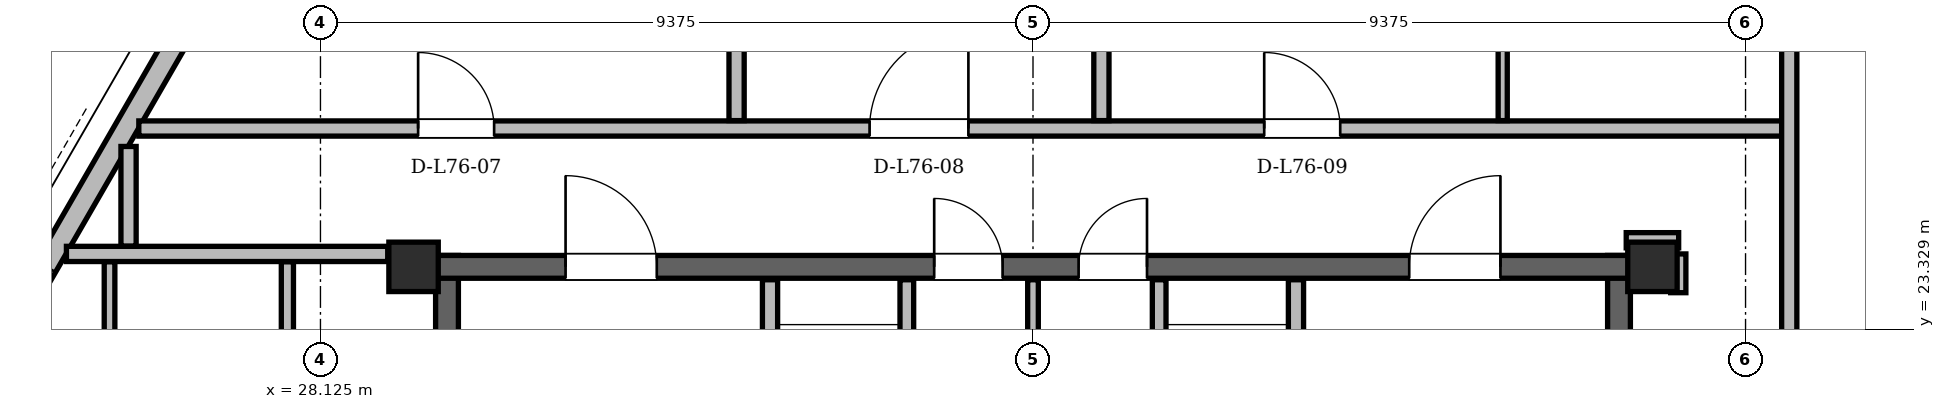
"""IFC4 building model, lengths in metres.
Left out: names, types, materials, properties, quantities, classifications, styles, units other than length and angle.
Written with IfcOpenShell. Run it as: python <this file> out.ifc"""

import sys

from ifc_helpers import new_model, si_unit, direction, frame, frame_2d, origin, origin_2d, place, context, subcontext, project, spatial, rectangle, hollow_rectangle, extrude, element, fill, save


model = new_model("IFC4")
c1 = context("Model", 3, precision=1e-05, world=origin(), true_north=direction((0.0, 1.0)))
c2 = subcontext(c1, "Body", "Model", "MODEL_VIEW")
j1 = project(units=[si_unit("LENGTHUNIT", "METRE"), si_unit("PLANEANGLEUNIT", "RADIAN")], contexts=[c1])
p1 = place(None, origin())
s1 = spatial("IfcSite", under=j1, at=p1, CompositionType="ELEMENT")
p2 = place(p1, origin())
s2 = spatial("IfcBuilding", under=s1, at=p2, CompositionType="ELEMENT")
p3 = place(p2, frame((0.0, 0.0, 288.9)))
s3 = spatial("IfcBuildingStorey", under=s2, at=p3, CompositionType="ELEMENT", Elevation=288.9)
for number, where, z_axis, x_axis in (
    (1, (45.65, 24.15, 0.0), (0.0, 0.0, 1.0), (1.0, 0.0, 0.0)),
    (2, (29.35, 24.15, 0.0), (0.0, 0.0, 1.0), (1.0, 0.0, 0.0)),
):
    element("IfcColumn", number, at=place(p3, frame(where, z_axis=z_axis, x_axis=x_axis)), inside=s3, PredefinedType="COLUMN", context=c2, shape_type="SweptSolid", body=[
        extrude(hollow_rectangle(XDim=0.65, YDim=0.65, WallThickness=0.05, at=origin_2d()), origin(), (0.0, 0.0, 1.0), 3.9),
    ])
for number, where, z_axis, x_axis in (
    (3, (29.79, 11.0, 0.0), (0.0, 0.0, 1.0), (0.0, 1.0, 0.0)),
    (4, (45.21, 11.0, 0.0), (0.0, 0.0, 1.0), (0.0, 1.0, 0.0)),
):
    element("IfcWall", number, at=place(p3, frame(where, z_axis=z_axis, x_axis=x_axis)), inside=s3, PredefinedType="SHEAR", context=c2, shape_type="SweptSolid", body=[
        extrude(rectangle(XDim=13.3, YDim=0.3, at=frame_2d((6.65, 0.0))), origin(), (0.0, 0.0, 1.0), 3.68),
    ])
p4 = place(p3, frame((29.65, 24.15, 0.0), z_axis=(0.0, 0.0, 1.0), x_axis=(1.0, 0.0, 0.0)))
e5 = element("IfcWall", 5, at=p4, inside=s3, PredefinedType="SHEAR", context=c2, shape_type="SweptSolid", body=[
    extrude(rectangle(XDim=15.7, YDim=0.3, at=frame_2d((7.85, 0.0))), origin(), (0.0, 0.0, 1.0), 3.68),
])
p5 = place(p4, frame((1.7, 0.0, 0.0)))
e6 = element("IfcOpeningElement", 6, at=p5, cuts=e5, PredefinedType="OPENING", context=c2, shape_type="SweptSolid", body=[
    extrude(rectangle(XDim=1.2, YDim=2.2, at=frame_2d((0.6, 1.1))), frame((0.0, 0.15, 0.0), z_axis=(0.0, -1.0, 0.0), x_axis=(1.0, 0.0, 0.0)), (0.0, 0.0, 1.0), 0.3),
])
p6 = place(p4, frame((12.8, 0.0, 0.0)))
e7 = element("IfcOpeningElement", 7, at=p6, cuts=e5, PredefinedType="OPENING", context=c2, shape_type="SweptSolid", body=[
    extrude(rectangle(XDim=1.2, YDim=2.2, at=frame_2d((0.6, 1.1))), frame((0.0, 0.15, 0.0), z_axis=(0.0, -1.0, 0.0), x_axis=(1.0, 0.0, 0.0)), (0.0, 0.0, 1.0), 0.3),
])
p7 = place(p4, frame((6.55, 0.0, 0.0)))
e8 = element("IfcOpeningElement", 8, at=p7, cuts=e5, PredefinedType="OPENING", context=c2, shape_type="SweptSolid", body=[
    extrude(rectangle(XDim=0.9, YDim=2.05, at=frame_2d((0.45, 1.025))), frame((0.0, 0.15, 0.0), z_axis=(0.0, -1.0, 0.0), x_axis=(1.0, 0.0, 0.0)), (0.0, 0.0, 1.0), 0.3),
])
p8 = place(p4, frame((8.45, 0.0, 0.0)))
e9 = element("IfcOpeningElement", 9, at=p8, cuts=e5, PredefinedType="OPENING", context=c2, shape_type="SweptSolid", body=[
    extrude(rectangle(XDim=0.9, YDim=2.05, at=frame_2d((0.45, 1.025))), frame((0.0, 0.15, 0.0), z_axis=(0.0, -1.0, 0.0), x_axis=(1.0, 0.0, 0.0)), (0.0, 0.0, 1.0), 0.3),
])
p9 = place(p3, frame((35.387, 42.986, 0.0), z_axis=(0.0, 0.0, 1.0), x_axis=(-0.499995967686, -0.86602773183, 0.0)))
e10 = element("IfcWall", 10, at=p9, inside=s3, PredefinedType="SOLIDWALL", context=c2, shape_type="SweptSolid", body=[
    extrude(rectangle(XDim=37.526, YDim=0.29, at=frame_2d((18.763, 0.0))), origin(), (0.0, 0.0, 1.0), 3.058),
])
p10 = place(p9, frame((3.74, 0.0, 0.0)))
e11 = element("IfcOpeningElement", 11, at=p10, cuts=e10, PredefinedType="OPENING", context=c2, shape_type="SweptSolid", body=[
    extrude(rectangle(XDim=1.3, YDim=2.2, at=frame_2d((0.65, 1.1))), frame((0.0, 0.145, 0.0), z_axis=(0.0, -1.0, 0.0), x_axis=(1.0, 0.0, 0.0)), (0.0, 0.0, 1.0), 0.29),
])
p11 = place(p9, frame((27.991, 0.0, 0.0)))
e12 = element("IfcOpeningElement", 12, at=p11, cuts=e10, PredefinedType="OPENING", context=c2, shape_type="SweptSolid", body=[
    extrude(rectangle(XDim=1.5, YDim=2.2, at=frame_2d((0.75, 1.1))), frame((0.0, 0.145, 0.0), z_axis=(0.0, -1.0, 0.0), x_axis=(1.0, 0.0, 0.0)), (0.0, 0.0, 1.0), 0.29),
])
p12 = place(p9, frame((35.454, 0.0, 0.85)))
e13 = element("IfcOpeningElement", 13, at=p12, cuts=e10, PredefinedType="OPENING", context=c2, shape_type="SweptSolid", body=[
    extrude(rectangle(XDim=1.2, YDim=1.48, at=frame_2d((0.6, 0.74))), frame((0.0, 0.145, 0.0), z_axis=(0.0, -1.0, 0.0), x_axis=(1.0, 0.0, 0.0)), (0.0, 0.0, 1.0), 0.29),
])
p13 = place(p9, frame((33.674, 0.0, 0.85)))
e14 = element("IfcOpeningElement", 14, at=p13, cuts=e10, PredefinedType="OPENING", context=c2, shape_type="SweptSolid", body=[
    extrude(rectangle(XDim=1.2, YDim=1.48, at=frame_2d((0.6, 0.74))), frame((0.0, 0.145, 0.0), z_axis=(0.0, -1.0, 0.0), x_axis=(1.0, 0.0, 0.0)), (0.0, 0.0, 1.0), 0.29),
])
p14 = place(p9, frame((21.746, 0.0, 0.85)))
e15 = element("IfcOpeningElement", 15, at=p14, cuts=e10, PredefinedType="OPENING", context=c2, shape_type="SweptSolid", body=[
    extrude(rectangle(XDim=1.6, YDim=1.7, at=frame_2d((0.8, 0.85))), frame((0.0, 0.145, 0.0), z_axis=(0.0, -1.0, 0.0), x_axis=(1.0, 0.0, 0.0)), (0.0, 0.0, 1.0), 0.29),
])
p15 = place(p9, frame((8.642, 0.0, 0.85)))
e16 = element("IfcOpeningElement", 16, at=p15, cuts=e10, PredefinedType="OPENING", context=c2, shape_type="SweptSolid", body=[
    extrude(rectangle(XDim=1.2, YDim=1.48, at=frame_2d((0.6, 0.74))), frame((0.0, 0.145, 0.0), z_axis=(0.0, -1.0, 0.0), x_axis=(1.0, 0.0, 0.0)), (0.0, 0.0, 1.0), 0.29),
])
p16 = place(p9, frame((16.523, 0.0, 0.85)))
e17 = element("IfcOpeningElement", 17, at=p16, cuts=e10, PredefinedType="OPENING", context=c2, shape_type="SweptSolid", body=[
    extrude(rectangle(XDim=1.8, YDim=1.75, at=frame_2d((0.9, 0.875))), frame((0.0, 0.145, 0.0), z_axis=(0.0, -1.0, 0.0), x_axis=(1.0, 0.0, 0.0)), (0.0, 0.0, 1.0), 0.29),
])
p17 = place(p9, frame((6.715, 0.0, 0.85)))
e18 = element("IfcOpeningElement", 18, at=p17, cuts=e10, PredefinedType="OPENING", context=c2, shape_type="SweptSolid", body=[
    extrude(rectangle(XDim=1.2, YDim=1.48, at=frame_2d((0.6, 0.74))), frame((0.0, 0.145, 0.0), z_axis=(0.0, -1.0, 0.0), x_axis=(1.0, 0.0, 0.0)), (0.0, 0.0, 1.0), 0.29),
])
p18 = place(p9, frame((1.125, 0.0, 0.85)))
e19 = element("IfcOpeningElement", 19, at=p18, cuts=e10, PredefinedType="OPENING", context=c2, shape_type="SweptSolid", body=[
    extrude(rectangle(XDim=1.2, YDim=1.48, at=frame_2d((0.6, 0.74))), frame((0.0, 0.145, 0.0), z_axis=(0.0, -1.0, 0.0), x_axis=(1.0, 0.0, 0.0)), (0.0, 0.0, 1.0), 0.29),
])
p19 = place(p3, frame((34.04, 19.48, 0.0), z_axis=(0.0, 0.0, 1.0), x_axis=(0.0, 1.0, 0.0)))
e20 = element("IfcWall", 20, at=p19, inside=s3, PredefinedType="PARTITIONING", context=c2, shape_type="SweptSolid", body=[
    extrude(rectangle(XDim=4.5, YDim=0.2, at=frame_2d((2.25, 0.0))), origin(), (0.0, 0.0, 1.0), 3.68),
])
p20 = place(p19, frame((2.12, 0.0, 0.0)))
e21 = element("IfcOpeningElement", 21, at=p20, cuts=e20, PredefinedType="OPENING", context=c2, shape_type="SweptSolid", body=[
    extrude(rectangle(XDim=1.1, YDim=2.2, at=frame_2d((0.55, 1.1))), frame((0.0, 0.1, 0.0), z_axis=(0.0, -1.0, 0.0), x_axis=(1.0, 0.0, 0.0)), (0.0, 0.0, 1.0), 0.2),
])
p21 = place(p3, frame((35.84, 20.96, 0.0), z_axis=(0.0, 0.0, 1.0), x_axis=(0.0, 1.0, 0.0)))
e22 = element("IfcWall", 22, at=p21, inside=s3, PredefinedType="PARTITIONING", context=c2, shape_type="SweptSolid", body=[
    extrude(rectangle(XDim=3.02, YDim=0.18, at=frame_2d((1.51, 0.0))), origin(), (0.0, 0.0, 1.0), 3.68),
])
p22 = place(p3, frame((40.96, 19.48, 0.0), z_axis=(0.0, 0.0, 1.0), x_axis=(0.0, 1.0, 0.0)))
e23 = element("IfcWall", 23, at=p22, inside=s3, PredefinedType="PARTITIONING", context=c2, shape_type="SweptSolid", body=[
    extrude(rectangle(XDim=4.5, YDim=0.2, at=frame_2d((2.25, 0.0))), origin(), (0.0, 0.0, 1.0), 3.68),
])
p23 = place(p22, frame((2.12, 0.0, 0.0)))
e24 = element("IfcOpeningElement", 24, at=p23, cuts=e23, PredefinedType="OPENING", context=c2, shape_type="SweptSolid", body=[
    extrude(rectangle(XDim=1.1, YDim=2.2, at=frame_2d((0.55, 1.1))), frame((0.0, 0.1, 0.0), z_axis=(0.0, -1.0, 0.0), x_axis=(1.0, 0.0, 0.0)), (0.0, 0.0, 1.0), 0.2),
])
p24 = place(p3, frame((39.16, 20.96, 0.0), z_axis=(0.0, 0.0, 1.0), x_axis=(0.0, 1.0, 0.0)))
e25 = element("IfcWall", 25, at=p24, inside=s3, PredefinedType="PARTITIONING", context=c2, shape_type="SweptSolid", body=[
    extrude(rectangle(XDim=3.02, YDim=0.18, at=frame_2d((1.51, 0.0))), origin(), (0.0, 0.0, 1.0), 3.68),
])
p25 = place(p3, frame((37.5, 21.06, 0.0), z_axis=(0.0, 0.0, 1.0), x_axis=(0.0, 1.0, 0.0)))
e26 = element("IfcWall", 26, at=p25, inside=s3, PredefinedType="PARTITIONING", context=c2, shape_type="SweptSolid", body=[
    extrude(rectangle(XDim=2.92, YDim=0.14, at=frame_2d((1.46, 0.0))), origin(), (0.0, 0.0, 1.0), 3.68),
])
p26 = place(p3, frame((24.783, 24.32, 0.0), z_axis=(0.0, 0.0, 1.0), x_axis=(1.0, 0.0, 0.0)))
e27 = element("IfcWall", 27, at=p26, inside=s3, PredefinedType="PARTITIONING", context=c2, shape_type="SweptSolid", body=[
    extrude(rectangle(XDim=4.227, YDim=0.2, at=frame_2d((2.114, 0.0))), origin(), (0.0, 0.0, 1.0), 3.68),
])
p27 = place(p3, frame((45.305, 24.5, 0.0), z_axis=(0.0, 0.0, 1.0), x_axis=(1.0, 0.0, 0.0)))
e28 = element("IfcWall", 28, at=p27, inside=s3, PredefinedType="PARTITIONING", context=c2, shape_type="SweptSolid", body=[
    extrude(rectangle(XDim=0.69, YDim=0.2, at=frame_2d((0.345, 0.0))), origin(), (0.0, 0.0, 1.0), 3.266),
])
p28 = place(p3, frame((25.735, 25.97, 0.0), z_axis=(0.0, 0.0, 1.0), x_axis=(1.0, 0.0, 0.0)))
e29 = element("IfcWall", 29, at=p28, inside=s3, PredefinedType="PARTITIONING", context=c2, shape_type="SweptSolid", body=[
    extrude(rectangle(XDim=21.715, YDim=0.2, at=frame_2d((10.857, 0.0))), origin(), (0.0, 0.0, 1.0), 3.266),
])
p29 = place(p28, frame((3.675, 0.0, 0.0)))
e30 = element("IfcOpeningElement", 30, at=p29, cuts=e29, PredefinedType="OPENING", context=c2, shape_type="SweptSolid", body=[
    extrude(rectangle(XDim=1.0, YDim=2.18, at=frame_2d((0.5, 1.09))), frame((0.0, 0.1, 0.0), z_axis=(0.0, -1.0, 0.0), x_axis=(1.0, 0.0, 0.0)), (0.0, 0.0, 1.0), 0.2),
])
p30 = place(p28, frame((9.615, 0.0, 0.0)))
e31 = element("IfcOpeningElement", 31, at=p30, cuts=e29, PredefinedType="OPENING", context=c2, shape_type="SweptSolid", body=[
    extrude(rectangle(XDim=1.3, YDim=2.2, at=frame_2d((0.65, 1.1))), frame((0.0, 0.1, 0.0), z_axis=(0.0, -1.0, 0.0), x_axis=(1.0, 0.0, 0.0)), (0.0, 0.0, 1.0), 0.2),
])
p31 = place(p28, frame((14.807, 0.0, 0.0)))
e32 = element("IfcOpeningElement", 32, at=p31, cuts=e29, PredefinedType="OPENING", context=c2, shape_type="SweptSolid", body=[
    extrude(rectangle(XDim=1.0, YDim=2.18, at=frame_2d((0.5, 1.09))), frame((0.0, 0.1, 0.0), z_axis=(0.0, -1.0, 0.0), x_axis=(1.0, 0.0, 0.0)), (0.0, 0.0, 1.0), 0.2),
])
p32 = place(p3, frame((25.35, 19.574, 0.0), z_axis=(0.0, 0.0, 1.0), x_axis=(0.0, 1.0, 0.0)))
e33 = element("IfcWall", 33, at=p32, inside=s3, PredefinedType="PARTITIONING", context=c2, shape_type="SweptSolid", body=[
    extrude(rectangle(XDim=4.642, YDim=0.14, at=frame_2d((2.321, 0.0))), origin(), (0.0, 0.0, 1.0), 3.68),
])
p33 = place(p3, frame((25.6, 24.424, 0.0), z_axis=(0.0, 0.0, 1.0), x_axis=(0.0, 1.0, 0.0)))
e34 = element("IfcWall", 34, at=p33, inside=s3, PredefinedType="PARTITIONING", context=c2, shape_type="SweptSolid", body=[
    extrude(rectangle(XDim=1.31, YDim=0.2, at=frame_2d((0.655, 0.0))), origin(), (0.0, 0.0, 1.0), 3.058),
])
p34 = place(p3, frame((27.69, 19.574, 0.0), z_axis=(0.0, 0.0, 1.0), x_axis=(0.0, 1.0, 0.0)))
e35 = element("IfcWall", 35, at=p34, inside=s3, PredefinedType="PARTITIONING", context=c2, shape_type="SweptSolid", body=[
    extrude(rectangle(XDim=4.642, YDim=0.16, at=frame_2d((2.321, 0.0))), origin(), (0.0, 0.0, 1.0), 3.68),
])
for number, where, z_axis, x_axis in (
    (36, (33.6, 26.074, 0.0), (0.0, 0.0, 1.0), (0.0, 1.0, 0.0)),
    (37, (38.4, 26.074, 0.0), (0.0, 0.0, 1.0), (0.0, 1.0, 0.0)),
):
    element("IfcWall", number, at=place(p3, frame(where, z_axis=z_axis, x_axis=x_axis)), inside=s3, PredefinedType="PARTITIONING", context=c2, shape_type="SweptSolid", body=[
        extrude(rectangle(XDim=4.292, YDim=0.2, at=frame_2d((2.146, 0.0))), origin(), (0.0, 0.0, 1.0), 3.68),
    ])
p35 = place(p3, frame((43.68, 26.074, 0.0), z_axis=(0.0, 0.0, 1.0), x_axis=(0.0, 1.0, 0.0)))
e38 = element("IfcWall", 38, at=p35, inside=s3, PredefinedType="PARTITIONING", context=c2, shape_type="SweptSolid", body=[
    extrude(rectangle(XDim=9.569, YDim=0.12, at=frame_2d((4.785, 0.0))), origin(), (0.0, 0.0, 1.0), 3.266),
])
p36 = place(p35, frame((4.291, 0.0, 0.0)))
e39 = element("IfcOpeningElement", 39, at=p36, cuts=e38, PredefinedType="OPENING", context=c2, shape_type="SweptSolid", body=[
    extrude(rectangle(XDim=0.88, YDim=2.08, at=frame_2d((0.44, 1.04))), frame((0.0, 0.06, 0.0), z_axis=(0.0, -1.0, 0.0), x_axis=(1.0, 0.0, 0.0)), (0.0, 0.0, 1.0), 0.12),
])
p37 = place(p3, frame((45.99, 23.81, 0.0), z_axis=(0.0, 0.0, 1.0), x_axis=(0.0, 1.0, 0.0)))
e40 = element("IfcWall", 40, at=p37, inside=s3, PredefinedType="PARTITIONING", context=c2, shape_type="SweptSolid", body=[
    extrude(rectangle(XDim=0.51, YDim=0.2, at=frame_2d((0.255, 0.0))), origin(), (0.0, 0.0, 1.0), 3.68),
])
p38 = place(p3, frame((47.45, 6.976, 0.0), z_axis=(0.0, 0.0, 1.0), x_axis=(0.0, 1.0, 0.0)))
e41 = element("IfcWall", 41, at=p38, inside=s3, PredefinedType="PARTITIONING", context=c2, shape_type="SweptSolid", body=[
    extrude(rectangle(XDim=22.137, YDim=0.2, at=frame_2d((11.068, 0.0))), origin(), (0.0, 0.0, 1.0), 3.058),
])
p39 = place(p38, frame((10.084, 0.0, 0.0)))
e42 = element("IfcOpeningElement", 42, at=p39, cuts=e41, PredefinedType="OPENING", context=c2, shape_type="SweptSolid", body=[
    extrude(rectangle(XDim=1.0, YDim=2.18, at=frame_2d((0.5, 1.09))), frame((0.0, 0.1, 0.0), z_axis=(0.0, -1.0, 0.0), x_axis=(1.0, 0.0, 0.0)), (0.0, 0.0, 1.0), 0.2),
])
p40 = place(p5, origin())
e43 = element("IfcDoor", 43, at=p40, inside=s3, OperationType="SINGLE_SWING_LEFT", PredefinedType="DOOR", context=c2, shape_type="SweptSolid", body=[
    extrude(rectangle(XDim=1.2, YDim=2.2, at=frame_2d((0.6, 1.1))), frame((0.0, 0.025, 0.0), z_axis=(0.0, -1.0, 0.0), x_axis=(1.0, 0.0, 0.0)), (0.0, 0.0, 1.0), 0.05),
])
fill(e6, e43)
p41 = place(p6, origin())
e44 = element("IfcDoor", 44, at=p41, inside=s3, OperationType="SINGLE_SWING_RIGHT", PredefinedType="DOOR", context=c2, shape_type="SweptSolid", body=[
    extrude(rectangle(XDim=1.2, YDim=2.2, at=frame_2d((0.6, 1.1))), frame((0.0, 0.025, 0.0), z_axis=(0.0, -1.0, 0.0), x_axis=(1.0, 0.0, 0.0)), (0.0, 0.0, 1.0), 0.05),
])
fill(e7, e44)
p42 = place(p7, origin())
e45 = element("IfcDoor", 45, at=p42, inside=s3, OperationType="SINGLE_SWING_LEFT", PredefinedType="DOOR", context=c2, shape_type="SweptSolid", body=[
    extrude(rectangle(XDim=0.9, YDim=2.05, at=frame_2d((0.45, 1.025))), frame((0.0, 0.025, 0.0), z_axis=(0.0, -1.0, 0.0), x_axis=(1.0, 0.0, 0.0)), (0.0, 0.0, 1.0), 0.05),
])
fill(e8, e45)
p43 = place(p8, origin())
e46 = element("IfcDoor", 46, at=p43, inside=s3, OperationType="SINGLE_SWING_RIGHT", PredefinedType="DOOR", context=c2, shape_type="SweptSolid", body=[
    extrude(rectangle(XDim=0.9, YDim=2.05, at=frame_2d((0.45, 1.025))), frame((0.0, 0.025, 0.0), z_axis=(0.0, -1.0, 0.0), x_axis=(1.0, 0.0, 0.0)), (0.0, 0.0, 1.0), 0.05),
])
fill(e9, e46)
p44 = place(p29, origin())
e47 = element("IfcDoor", 47, at=p44, inside=s3, OperationType="SINGLE_SWING_LEFT", PredefinedType="DOOR", context=c2, shape_type="SweptSolid", body=[
    extrude(rectangle(XDim=1.0, YDim=2.18, at=frame_2d((0.5, 1.09))), frame((0.0, 0.025, 0.0), z_axis=(0.0, -1.0, 0.0), x_axis=(1.0, 0.0, 0.0)), (0.0, 0.0, 1.0), 0.05),
])
fill(e30, e47)
p45 = place(p30, origin())
e48 = element("IfcDoor", 48, at=p45, inside=s3, OperationType="SINGLE_SWING_RIGHT", PredefinedType="DOOR", context=c2, shape_type="SweptSolid", body=[
    extrude(rectangle(XDim=1.3, YDim=2.2, at=frame_2d((0.65, 1.1))), frame((0.0, 0.025, 0.0), z_axis=(0.0, -1.0, 0.0), x_axis=(1.0, 0.0, 0.0)), (0.0, 0.0, 1.0), 0.05),
])
fill(e31, e48)
p46 = place(p31, origin())
e49 = element("IfcDoor", 49, at=p46, inside=s3, OperationType="SINGLE_SWING_LEFT", PredefinedType="DOOR", context=c2, shape_type="SweptSolid", body=[
    extrude(rectangle(XDim=1.0, YDim=2.18, at=frame_2d((0.5, 1.09))), frame((0.0, 0.025, 0.0), z_axis=(0.0, -1.0, 0.0), x_axis=(1.0, 0.0, 0.0)), (0.0, 0.0, 1.0), 0.05),
])
fill(e32, e49)
save(model, sys.argv[1])
